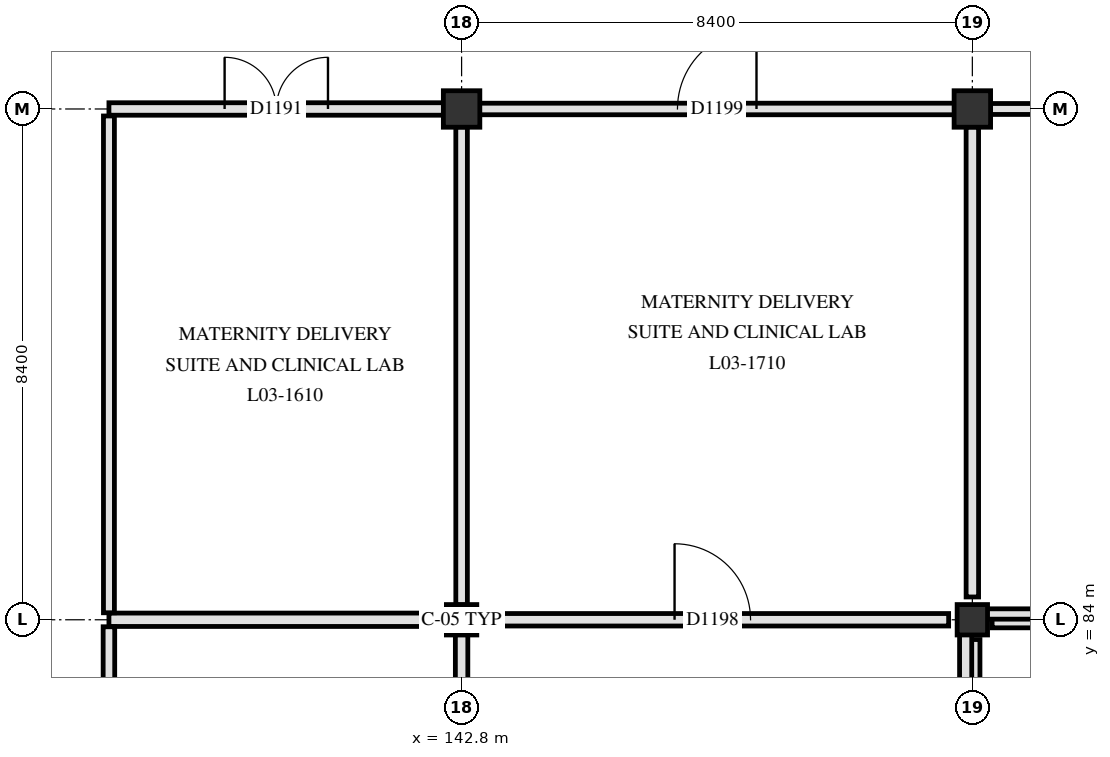
"""IFC4 building model, lengths in metres.
Left out: names, types, materials, properties, quantities, classifications, styles, units other than length and angle.
Written with IfcOpenShell. Run it as: python <this file> out.ifc"""

import sys

from ifc_helpers import new_model, si_unit, direction, frame, frame_2d, origin, origin_2d, place, context, subcontext, project, spatial, rectangle, extrude, element, fill, save


model = new_model("IFC4")
c1 = context("Model", 3, precision=1e-05, world=origin(), true_north=direction((0.0, 1.0)))
c2 = subcontext(c1, "Body", "Model", "MODEL_VIEW")
j1 = project(units=[si_unit("LENGTHUNIT", "METRE"), si_unit("PLANEANGLEUNIT", "RADIAN")], contexts=[c1])
p1 = place(None, origin())
s1 = spatial("IfcSite", under=j1, at=p1, CompositionType="ELEMENT")
p2 = place(p1, origin())
s2 = spatial("IfcBuilding", under=s1, at=p2, CompositionType="ELEMENT")
p3 = place(p2, frame((0.0, 0.0, 14.4)))
s3 = spatial("IfcBuildingStorey", under=s2, at=p3, CompositionType="ELEMENT", Elevation=14.4)
p4 = place(p3, frame((142.8, 84.0, 0.0), z_axis=(0.0, 0.0, 1.0), x_axis=(1.0, 0.0, 0.0)))
e1 = element("IfcColumn", 1, at=p4, inside=s3, PredefinedType="COLUMN", context=c2, shape_type="SweptSolid", body=[
    extrude(rectangle(XDim=0.5, YDim=0.5, at=origin_2d()), origin(), (0.0, 0.0, 1.0), 4.2),
])
p5 = place(p3, frame((142.8, 92.4, 0.0), z_axis=(0.0, 0.0, 1.0), x_axis=(1.0, 0.0, 0.0)))
e2 = element("IfcColumn", 2, at=p5, inside=s3, PredefinedType="COLUMN", context=c2, shape_type="SweptSolid", body=[
    extrude(rectangle(XDim=0.6, YDim=0.6, at=origin_2d()), origin(), (0.0, 0.0, 1.0), 4.2),
])
p6 = place(p3, frame((151.2, 84.0, 0.0), z_axis=(0.0, 0.0, 1.0), x_axis=(1.0, 0.0, 0.0)))
e3 = element("IfcColumn", 3, at=p6, inside=s3, PredefinedType="COLUMN", context=c2, shape_type="SweptSolid", body=[
    extrude(rectangle(XDim=0.5, YDim=0.5, at=origin_2d()), origin(), (0.0, 0.0, 1.0), 4.2),
])
p7 = place(p3, frame((151.2, 92.4, 0.0), z_axis=(0.0, 0.0, 1.0), x_axis=(1.0, 0.0, 0.0)))
e4 = element("IfcColumn", 4, at=p7, inside=s3, PredefinedType="COLUMN", context=c2, shape_type="SweptSolid", body=[
    extrude(rectangle(XDim=0.6, YDim=0.6, at=origin_2d()), origin(), (0.0, 0.0, 1.0), 4.2),
])
p8 = place(p3, frame((153.274, 84.0, 0.0), z_axis=(0.0, 0.0, 1.0), x_axis=(-1.0, 0.0, 0.0)))
e5 = element("IfcWall", 5, at=p8, inside=s3, PredefinedType="SOLIDWALL", context=c2, shape_type="SweptSolid", body=[
    extrude(rectangle(XDim=1.749, YDim=0.265, at=frame_2d((0.875, 0.0))), origin(), (0.0, 0.0, 1.0), 3.89),
])
p9 = place(p3, frame((151.2, 83.675, 0.0), z_axis=(0.0, 0.0, 1.0), x_axis=(0.0, -1.0, 0.0)))
e6 = element("IfcWall", 6, at=p9, inside=s3, PredefinedType="SOLIDWALL", context=c2, shape_type="SweptSolid", body=[
    extrude(rectangle(XDim=0.908, YDim=0.25, at=frame_2d((0.454, 0.0))), origin(), (0.0, 0.0, 1.0), 3.89),
])
p10 = place(p3, frame((153.274, 84.095, 4.18), z_axis=(0.0, 0.0, 1.0), x_axis=(-1.0, 0.0, 0.0)))
e7 = element("IfcWall", 7, at=p10, inside=s3, PredefinedType="PARAPET", context=c2, shape_type="SweptSolid", body=[
    extrude(rectangle(XDim=2.074, YDim=0.17, at=frame_2d((1.037, 0.0))), origin(), (0.0, 0.0, 1.0), 1.17),
])
p11 = place(p3, frame((151.09, 84.0, 4.18), z_axis=(0.0, 0.0, 1.0), x_axis=(0.0, -1.0, 0.0)))
e8 = element("IfcWall", 8, at=p11, inside=s3, PredefinedType="PARAPET", context=c2, shape_type="SweptSolid", body=[
    extrude(rectangle(XDim=1.233, YDim=0.2, at=frame_2d((0.616, 0.0))), origin(), (0.0, 0.0, 1.0), 1.17),
])
p12 = place(p3, frame((137.0, 84.0, 0.0), z_axis=(0.0, 0.0, 1.0), x_axis=(1.0, 0.0, 0.0)))
e9 = element("IfcWall", 9, at=p12, inside=s3, PredefinedType="PARTITIONING", context=c2, shape_type="SweptSolid", body=[
    extrude(rectangle(XDim=5.555, YDim=0.22, at=frame_2d((2.777, 0.0))), origin(), (0.0, 0.0, 1.0), 3.29),
])
p13 = place(p3, frame((143.045, 84.0, 0.0), z_axis=(0.0, 0.0, 1.0), x_axis=(1.0, 0.0, 0.0)))
e10 = element("IfcWall", 10, at=p13, inside=s3, PredefinedType="PARTITIONING", context=c2, shape_type="SweptSolid", body=[
    extrude(rectangle(XDim=7.765, YDim=0.205, at=frame_2d((3.883, 0.0))), origin(), (0.0, 0.0, 1.0), 3.29),
])
p14 = place(p13, frame((3.258, 0.0, 0.0)))
e11 = element("IfcOpeningElement", 11, at=p14, cuts=e10, PredefinedType="OPENING", context=c2, shape_type="SweptSolid", body=[
    extrude(rectangle(XDim=1.25, YDim=2.2, at=frame_2d((0.625, 1.1))), frame((0.0, 0.113, 0.0), z_axis=(0.0, -1.0, 0.0), x_axis=(1.0, 0.0, 0.0)), (0.0, 0.0, 1.0), 0.225),
])
p15 = place(p3, frame((137.0, 92.4, 0.0), z_axis=(0.0, 0.0, 1.0), x_axis=(1.0, 0.0, 0.0)))
e12 = element("IfcWall", 12, at=p15, inside=s3, PredefinedType="PARTITIONING", context=c2, shape_type="SweptSolid", body=[
    extrude(rectangle(XDim=5.505, YDim=0.205, at=frame_2d((2.752, 0.0))), origin(), (0.0, 0.0, 1.0), 2.89),
])
p16 = place(p15, frame((1.903, 0.0, 0.0)))
e13 = element("IfcOpeningElement", 13, at=p16, cuts=e12, PredefinedType="OPENING", context=c2, shape_type="SweptSolid", body=[
    extrude(rectangle(XDim=1.7, YDim=2.25, at=frame_2d((0.85, 1.125))), frame((0.0, 0.113, 0.0), z_axis=(0.0, -1.0, 0.0), x_axis=(1.0, 0.0, 0.0)), (0.0, 0.0, 1.0), 0.225),
])
p17 = place(p3, frame((143.095, 92.4, 0.0), z_axis=(0.0, 0.0, 1.0), x_axis=(1.0, 0.0, 0.0)))
e14 = element("IfcWall", 14, at=p17, inside=s3, PredefinedType="PARTITIONING", context=c2, shape_type="SweptSolid", body=[
    extrude(rectangle(XDim=7.81, YDim=0.19, at=frame_2d((3.905, 0.0))), origin(), (0.0, 0.0, 1.0), 2.89),
])
p18 = place(p17, frame((3.255, 0.0, 0.0)))
e15 = element("IfcOpeningElement", 15, at=p18, cuts=e14, PredefinedType="OPENING", context=c2, shape_type="SweptSolid", body=[
    extrude(rectangle(XDim=1.3, YDim=2.2, at=frame_2d((0.65, 1.1))), frame((0.0, 0.105, 0.0), z_axis=(0.0, -1.0, 0.0), x_axis=(1.0, 0.0, 0.0)), (0.0, 0.0, 1.0), 0.21),
])
p19 = place(p3, frame((151.495, 92.4, 0.0), z_axis=(0.0, 0.0, 1.0), x_axis=(1.0, 0.0, 0.0)))
e16 = element("IfcWall", 16, at=p19, inside=s3, PredefinedType="PARTITIONING", context=c2, shape_type="SweptSolid", body=[
    extrude(rectangle(XDim=7.81, YDim=0.18, at=frame_2d((3.905, 0.0))), origin(), (0.0, 0.0, 1.0), 2.89),
])
p20 = place(p19, frame((3.245, 0.0, 0.0)))
e17 = element("IfcOpeningElement", 17, at=p20, cuts=e16, PredefinedType="OPENING", context=c2, shape_type="SweptSolid", body=[
    extrude(rectangle(XDim=1.32, YDim=2.18, at=frame_2d((0.66, 1.09))), frame((0.0, 0.1, 0.0), z_axis=(0.0, -1.0, 0.0), x_axis=(1.0, 0.0, 0.0)), (0.0, 0.0, 1.0), 0.2),
])
p21 = place(p3, frame((137.0, 78.315, 0.0), z_axis=(0.0, 0.0, 1.0), x_axis=(0.0, 1.0, 0.0)))
e18 = element("IfcWall", 18, at=p21, inside=s3, PredefinedType="PARTITIONING", context=c2, shape_type="SweptSolid", body=[
    extrude(rectangle(XDim=5.57, YDim=0.19, at=frame_2d((2.785, 0.0))), origin(), (0.0, 0.0, 1.0), 3.29),
])
p22 = place(p3, frame((137.0, 84.115, 0.0), z_axis=(0.0, 0.0, 1.0), x_axis=(0.0, 1.0, 0.0)))
e19 = element("IfcWall", 19, at=p22, inside=s3, PredefinedType="PARTITIONING", context=c2, shape_type="SweptSolid", body=[
    extrude(rectangle(XDim=8.17, YDim=0.18, at=frame_2d((4.085, 0.0))), origin(), (0.0, 0.0, 1.0), 2.89),
])
p23 = place(p3, frame((142.8, 78.315, 0.0), z_axis=(0.0, 0.0, 1.0), x_axis=(0.0, 1.0, 0.0)))
e20 = element("IfcWall", 20, at=p23, inside=s3, PredefinedType="PARTITIONING", context=c2, shape_type="SweptSolid", body=[
    extrude(rectangle(XDim=5.44, YDim=0.205, at=frame_2d((2.72, 0.0))), origin(), (0.0, 0.0, 1.0), 3.89),
])
p24 = place(p3, frame((142.8, 84.245, 0.0), z_axis=(0.0, 0.0, 1.0), x_axis=(0.0, 1.0, 0.0)))
e21 = element("IfcWall", 21, at=p24, inside=s3, PredefinedType="PARTITIONING", context=c2, shape_type="SweptSolid", body=[
    extrude(rectangle(XDim=7.86, YDim=0.19, at=frame_2d((3.93, 0.0))), origin(), (0.0, 0.0, 1.0), 3.34),
])
p25 = place(p3, frame((151.2, 84.375, 0.0), z_axis=(0.0, 0.0, 1.0), x_axis=(0.0, 1.0, 0.0)))
e22 = element("IfcWall", 22, at=p25, inside=s3, PredefinedType="PARTITIONING", context=c2, shape_type="SweptSolid", body=[
    extrude(rectangle(XDim=7.73, YDim=0.205, at=frame_2d((3.865, 0.0))), origin(), (0.0, 0.0, 1.0), 3.34),
])
p26 = place(p16, origin())
e23 = element("IfcDoor", 23, at=p26, inside=s3, OperationType="DOUBLE_SWING_RIGHT", PredefinedType="DOOR", context=c2, shape_type="SweptSolid", body=[
    extrude(rectangle(XDim=1.7, YDim=2.25, at=frame_2d((0.85, 1.125))), frame((0.0, 0.025, 0.0), z_axis=(0.0, -1.0, 0.0), x_axis=(1.0, 0.0, 0.0)), (0.0, 0.0, 1.0), 0.05),
])
fill(e13, e23)
p27 = place(p14, origin())
e24 = element("IfcDoor", 24, at=p27, inside=s3, OperationType="SINGLE_SWING_LEFT", PredefinedType="DOOR", context=c2, shape_type="SweptSolid", body=[
    extrude(rectangle(XDim=1.25, YDim=2.2, at=frame_2d((0.625, 1.1))), frame((0.0, 0.025, 0.0), z_axis=(0.0, -1.0, 0.0), x_axis=(1.0, 0.0, 0.0)), (0.0, 0.0, 1.0), 0.05),
])
fill(e11, e24)
p28 = place(p18, origin())
e25 = element("IfcDoor", 25, at=p28, inside=s3, OperationType="SINGLE_SWING_RIGHT", PredefinedType="DOOR", context=c2, shape_type="SweptSolid", body=[
    extrude(rectangle(XDim=1.3, YDim=2.2, at=frame_2d((0.65, 1.1))), frame((0.0, 0.025, 0.0), z_axis=(0.0, -1.0, 0.0), x_axis=(1.0, 0.0, 0.0)), (0.0, 0.0, 1.0), 0.05),
])
fill(e15, e25)
save(model, sys.argv[1])
